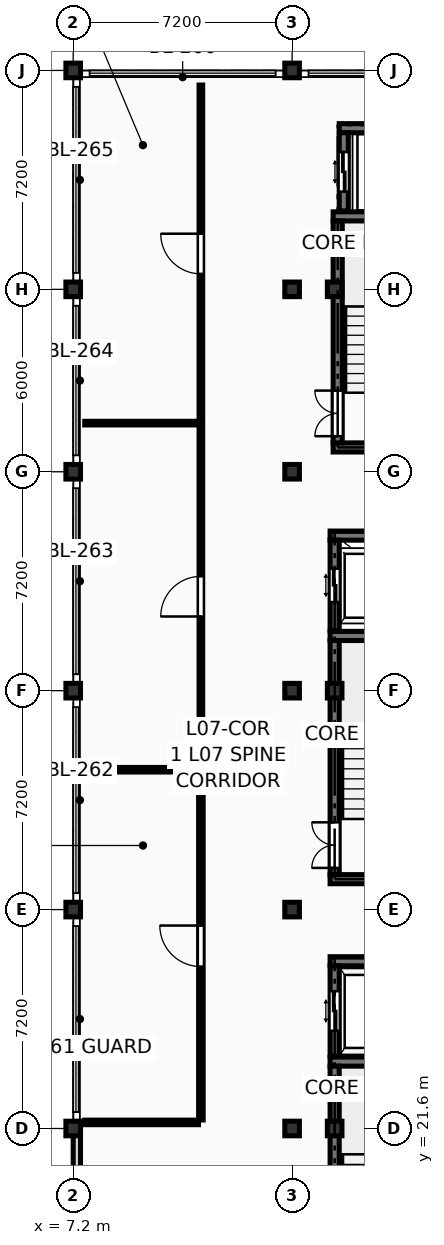
"""IFC4 building model, lengths in metres.
Left out: names, types, materials, properties, quantities, classifications, styles, units other than length and angle.
Written with IfcOpenShell. Run it as: python <this file> out.ifc"""

import sys

from ifc_helpers import new_model, si_unit, direction, frame, frame_2d, origin, origin_2d, place, context, subcontext, project, spatial, rectangle, extrude, element, fill, save


model = new_model("IFC4")
c1 = context("Model", 3, precision=1e-05, world=origin(), true_north=direction((0.0, 1.0)))
c2 = subcontext(c1, "Body", "Model", "MODEL_VIEW")
j1 = project(units=[si_unit("LENGTHUNIT", "METRE"), si_unit("PLANEANGLEUNIT", "RADIAN")], contexts=[c1])
p1 = place(None, origin())
s1 = spatial("IfcSite", under=j1, at=p1, CompositionType="ELEMENT")
p2 = place(p1, origin())
s2 = spatial("IfcBuilding", under=s1, at=p2, CompositionType="ELEMENT")
p3 = place(p2, frame((0.0, 0.0, 26.25)))
s3 = spatial("IfcBuildingStorey", under=s2, at=p3, CompositionType="ELEMENT", Elevation=26.25)
for number, where, z_axis, x_axis in (
    (1, (7.2, 21.6, 0.0), (0.0, 0.0, 1.0), (1.0, 0.0, 0.0)),
    (2, (7.2, 28.8, 0.0), (0.0, 0.0, 1.0), (1.0, 0.0, 0.0)),
    (3, (7.2, 36.0, 0.0), (0.0, 0.0, 1.0), (1.0, 0.0, 0.0)),
    (4, (7.2, 43.2, 0.0), (0.0, 0.0, 1.0), (1.0, 0.0, 0.0)),
    (5, (7.2, 49.2, 0.0), (0.0, 0.0, 1.0), (1.0, 0.0, 0.0)),
    (6, (7.2, 56.4, 0.0), (0.0, 0.0, 1.0), (1.0, 0.0, 0.0)),
    (7, (14.4, 21.6, 0.0), (0.0, 0.0, 1.0), (1.0, 0.0, 0.0)),
    (8, (14.4, 28.8, 0.0), (0.0, 0.0, 1.0), (1.0, 0.0, 0.0)),
    (9, (14.4, 36.0, 0.0), (0.0, 0.0, 1.0), (1.0, 0.0, 0.0)),
    (10, (14.4, 43.2, 0.0), (0.0, 0.0, 1.0), (1.0, 0.0, 0.0)),
    (11, (14.4, 49.2, 0.0), (0.0, 0.0, 1.0), (1.0, 0.0, 0.0)),
    (12, (14.4, 56.4, 0.0), (0.0, 0.0, 1.0), (1.0, 0.0, 0.0)),
    (13, (15.8, 21.6, 0.0), (0.0, 0.0, 1.0), (1.0, 0.0, 0.0)),
    (14, (15.8, 36.0, 0.0), (0.0, 0.0, 1.0), (1.0, 0.0, 0.0)),
    (15, (15.8, 49.2, 0.0), (0.0, 0.0, 1.0), (1.0, 0.0, 0.0)),
):
    element("IfcColumn", number, at=place(p3, frame(where, z_axis=z_axis, x_axis=x_axis)), inside=s3, PredefinedType="COLUMN", context=c2, shape_type="SweptSolid", body=[
        extrude(rectangle(XDim=0.48, YDim=0.48, at=origin_2d()), origin(), (0.0, 0.0, 1.0), 3.45),
    ])
p4 = place(p3, frame((7.32, 14.4, 0.0), z_axis=(0.0, 0.0, 1.0), x_axis=(0.0, 1.0, 0.0)))
e16 = element("IfcWall", 16, at=p4, inside=s3, PredefinedType="SOLIDWALL", context=c2, shape_type="SweptSolid", body=[
    extrude(rectangle(XDim=7.2, YDim=0.24, at=frame_2d((3.6, 0.0))), origin(), (0.0, 0.0, 1.0), 2.69),
])
p5 = place(p3, frame((15.65, 23.8, 0.0), z_axis=(0.0, 0.0, 1.0), x_axis=(1.0, 0.0, 0.0)))
e17 = element("IfcWall", 17, at=p5, inside=s3, PredefinedType="SHEAR", context=c2, shape_type="SweptSolid", body=[
    extrude(rectangle(XDim=4.82, YDim=0.3, at=frame_2d((2.41, 0.0))), origin(), (0.0, 0.0, 1.0), 3.24),
])
p6 = place(p3, frame((15.8, 15.95, 0.0), z_axis=(0.0, 0.0, 1.0), x_axis=(0.0, 1.0, 0.0)))
e18 = element("IfcWall", 18, at=p6, inside=s3, PredefinedType="SHEAR", context=c2, shape_type="SweptSolid", body=[
    extrude(rectangle(XDim=7.7, YDim=0.3, at=frame_2d((3.85, 0.0))), origin(), (0.0, 0.0, 1.0), 3.24),
])
p7 = place(p6, frame((0.22, 0.0, 0.0)))
e19 = element("IfcOpeningElement", 19, at=p7, cuts=e18, PredefinedType="OPENING", context=c2, shape_type="SweptSolid", body=[
    extrude(rectangle(XDim=1.5, YDim=2.2, at=frame_2d((0.75, 1.1))), frame((0.0, 0.162, 0.0), z_axis=(0.0, -1.0, 0.0), x_axis=(1.0, 0.0, 0.0)), (0.0, 0.0, 1.0), 0.324),
])
for number, where, z_axis, x_axis in (
    (20, (15.65, 29.8, 0.0), (0.0, 0.0, 1.0), (1.0, 0.0, 0.0)),
    (21, (15.65, 37.8, 0.0), (0.0, 0.0, 1.0), (1.0, 0.0, 0.0)),
):
    element("IfcWall", number, at=place(p3, frame(where, z_axis=z_axis, x_axis=x_axis)), inside=s3, PredefinedType="SHEAR", context=c2, shape_type="SweptSolid", body=[
        extrude(rectangle(XDim=4.82, YDim=0.3, at=frame_2d((2.41, 0.0))), origin(), (0.0, 0.0, 1.0), 3.24),
    ])
p8 = place(p3, frame((15.8, 29.95, 0.0), z_axis=(0.0, 0.0, 1.0), x_axis=(0.0, 1.0, 0.0)))
e22 = element("IfcWall", 22, at=p8, inside=s3, PredefinedType="SHEAR", context=c2, shape_type="SweptSolid", body=[
    extrude(rectangle(XDim=7.7, YDim=0.3, at=frame_2d((3.85, 0.0))), origin(), (0.0, 0.0, 1.0), 3.24),
])
p9 = place(p8, frame((0.22, 0.0, 0.0)))
e23 = element("IfcOpeningElement", 23, at=p9, cuts=e22, PredefinedType="OPENING", context=c2, shape_type="SweptSolid", body=[
    extrude(rectangle(XDim=1.5, YDim=2.2, at=frame_2d((0.75, 1.1))), frame((0.0, 0.162, 0.0), z_axis=(0.0, -1.0, 0.0), x_axis=(1.0, 0.0, 0.0)), (0.0, 0.0, 1.0), 0.324),
])
for number, where, z_axis, x_axis in (
    (24, (15.75, 44.0, 0.0), (0.0, 0.0, 1.0), (1.0, 0.0, 0.0)),
    (25, (15.75, 51.6, 0.0), (0.0, 0.0, 1.0), (1.0, 0.0, 0.0)),
):
    element("IfcWall", number, at=place(p3, frame(where, z_axis=z_axis, x_axis=x_axis)), inside=s3, PredefinedType="SHEAR", context=c2, shape_type="SweptSolid", body=[
        extrude(rectangle(XDim=4.42, YDim=0.3, at=frame_2d((2.21, 0.0))), origin(), (0.0, 0.0, 1.0), 3.24),
    ])
p10 = place(p3, frame((15.9, 44.15, 0.0), z_axis=(0.0, 0.0, 1.0), x_axis=(0.0, 1.0, 0.0)))
e26 = element("IfcWall", 26, at=p10, inside=s3, PredefinedType="SHEAR", context=c2, shape_type="SweptSolid", body=[
    extrude(rectangle(XDim=7.3, YDim=0.3, at=frame_2d((3.65, 0.0))), origin(), (0.0, 0.0, 1.0), 3.24),
])
p11 = place(p10, frame((0.22, 0.0, 0.0)))
e27 = element("IfcOpeningElement", 27, at=p11, cuts=e26, PredefinedType="OPENING", context=c2, shape_type="SweptSolid", body=[
    extrude(rectangle(XDim=1.5, YDim=2.2, at=frame_2d((0.75, 1.1))), frame((0.0, 0.162, 0.0), z_axis=(0.0, -1.0, 0.0), x_axis=(1.0, 0.0, 0.0)), (0.0, 0.0, 1.0), 0.324),
])
p12 = place(p3, frame((15.65, 27.1, 0.0), z_axis=(0.0, 0.0, 1.0), x_axis=(1.0, 0.0, 0.0)))
e28 = element("IfcWall", 28, at=p12, inside=s3, PredefinedType="SHEAR", context=c2, shape_type="SweptSolid", body=[
    extrude(rectangle(XDim=2.56, YDim=0.3, at=frame_2d((1.28, 0.0))), origin(), (0.0, 0.0, 1.0), 3.24),
])
p13 = place(p3, frame((15.8, 23.98, 0.0), z_axis=(0.0, 0.0, 1.0), x_axis=(0.0, 1.0, 0.0)))
e29 = element("IfcWall", 29, at=p13, inside=s3, PredefinedType="SHEAR", context=c2, shape_type="SweptSolid", body=[
    extrude(rectangle(XDim=2.97, YDim=0.3, at=frame_2d((1.485, 0.0))), origin(), (0.0, 0.0, 1.0), 3.24),
])
p14 = place(p13, frame((0.835, 0.0, 0.0)))
e30 = element("IfcOpeningElement", 30, at=p14, cuts=e29, PredefinedType="OPENING", context=c2, shape_type="SweptSolid", body=[
    extrude(rectangle(XDim=1.3, YDim=2.25, at=frame_2d((0.65, 1.125))), frame((0.0, 0.162, 0.0), z_axis=(0.0, -1.0, 0.0), x_axis=(1.0, 0.0, 0.0)), (0.0, 0.0, 1.0), 0.324),
])
p15 = place(p3, frame((15.65, 41.1, 0.0), z_axis=(0.0, 0.0, 1.0), x_axis=(1.0, 0.0, 0.0)))
e31 = element("IfcWall", 31, at=p15, inside=s3, PredefinedType="SHEAR", context=c2, shape_type="SweptSolid", body=[
    extrude(rectangle(XDim=2.56, YDim=0.3, at=frame_2d((1.28, 0.0))), origin(), (0.0, 0.0, 1.0), 3.24),
])
p16 = place(p3, frame((15.8, 37.98, 0.0), z_axis=(0.0, 0.0, 1.0), x_axis=(0.0, 1.0, 0.0)))
e32 = element("IfcWall", 32, at=p16, inside=s3, PredefinedType="SHEAR", context=c2, shape_type="SweptSolid", body=[
    extrude(rectangle(XDim=2.97, YDim=0.3, at=frame_2d((1.485, 0.0))), origin(), (0.0, 0.0, 1.0), 3.24),
])
p17 = place(p16, frame((0.935, 0.0, 0.0)))
e33 = element("IfcOpeningElement", 33, at=p17, cuts=e32, PredefinedType="OPENING", context=c2, shape_type="SweptSolid", body=[
    extrude(rectangle(XDim=1.1, YDim=2.2, at=frame_2d((0.55, 1.1))), frame((0.0, 0.162, 0.0), z_axis=(0.0, -1.0, 0.0), x_axis=(1.0, 0.0, 0.0)), (0.0, 0.0, 1.0), 0.324),
])
p18 = place(p3, frame((15.95, 54.5, 0.0), z_axis=(0.0, 0.0, 1.0), x_axis=(1.0, 0.0, 0.0)))
e34 = element("IfcWall", 34, at=p18, inside=s3, PredefinedType="SHEAR", context=c2, shape_type="SweptSolid", body=[
    extrude(rectangle(XDim=3.0, YDim=0.3, at=frame_2d((1.5, 0.0))), origin(), (0.0, 0.0, 1.0), 3.24),
])
p19 = place(p3, frame((16.1, 51.78, 0.0), z_axis=(0.0, 0.0, 1.0), x_axis=(0.0, 1.0, 0.0)))
e35 = element("IfcWall", 35, at=p19, inside=s3, PredefinedType="SHEAR", context=c2, shape_type="SweptSolid", body=[
    extrude(rectangle(XDim=2.57, YDim=0.3, at=frame_2d((1.285, 0.0))), origin(), (0.0, 0.0, 1.0), 3.24),
])
p20 = place(p19, frame((0.635, 0.0, 0.0)))
e36 = element("IfcOpeningElement", 36, at=p20, cuts=e35, PredefinedType="OPENING", context=c2, shape_type="SweptSolid", body=[
    extrude(rectangle(XDim=1.3, YDim=2.25, at=frame_2d((0.65, 1.125))), frame((0.0, 0.162, 0.0), z_axis=(0.0, -1.0, 0.0), x_axis=(1.0, 0.0, 0.0)), (0.0, 0.0, 1.0), 0.324),
])
p21 = place(p3, frame((7.58, 21.8, 0.0), z_axis=(0.0, 0.0, 1.0), x_axis=(1.0, 0.0, 0.0)))
e37 = element("IfcWall", 37, at=p21, inside=s3, PredefinedType="PARTITIONING", context=c2, shape_type="SweptSolid", body=[
    extrude(rectangle(XDim=3.74, YDim=0.15, at=frame_2d((1.87, 0.0))), origin(), (0.0, 0.0, 1.0), 2.541),
])
p22 = place(p3, frame((11.4, 21.88, 0.0), z_axis=(0.0, 0.0, 1.0), x_axis=(0.0, 1.0, 0.0)))
e38 = element("IfcWall", 38, at=p22, inside=s3, PredefinedType="PARTITIONING", context=c2, shape_type="SweptSolid", body=[
    extrude(rectangle(XDim=11.44, YDim=0.15, at=frame_2d((5.72, 0.0))), origin(), (0.0, 0.0, 1.0), 3.225),
])
p23 = place(p22, frame((5.045, 0.0, 0.0)))
e39 = element("IfcOpeningElement", 39, at=p23, cuts=e38, PredefinedType="OPENING", context=c2, shape_type="SweptSolid", body=[
    extrude(rectangle(XDim=1.35, YDim=2.2, at=frame_2d((0.675, 1.1))), frame((0.0, 0.087, 0.0), z_axis=(0.0, -1.0, 0.0), x_axis=(1.0, 0.0, 0.0)), (0.0, 0.0, 1.0), 0.174),
])
p24 = place(p3, frame((7.58, 33.4, 0.0), z_axis=(0.0, 0.0, 1.0), x_axis=(1.0, 0.0, 0.0)))
e40 = element("IfcWall", 40, at=p24, inside=s3, PredefinedType="PARTITIONING", context=c2, shape_type="SweptSolid", body=[
    extrude(rectangle(XDim=3.74, YDim=0.15, at=frame_2d((1.87, 0.0))), origin(), (0.0, 0.0, 1.0), 3.225),
])
p25 = place(p3, frame((11.4, 33.48, 0.0), z_axis=(0.0, 0.0, 1.0), x_axis=(0.0, 1.0, 0.0)))
e41 = element("IfcWall", 41, at=p25, inside=s3, PredefinedType="PARTITIONING", context=c2, shape_type="SweptSolid", body=[
    extrude(rectangle(XDim=11.24, YDim=0.12, at=frame_2d((5.62, 0.0))), origin(), (0.0, 0.0, 1.0), 3.225),
])
p26 = place(p25, frame((4.96, 0.0, 0.0)))
e42 = element("IfcOpeningElement", 42, at=p26, cuts=e41, PredefinedType="OPENING", context=c2, shape_type="SweptSolid", body=[
    extrude(rectangle(XDim=1.32, YDim=2.2, at=frame_2d((0.66, 1.1))), frame((0.0, 0.072, 0.0), z_axis=(0.0, -1.0, 0.0), x_axis=(1.0, 0.0, 0.0)), (0.0, 0.0, 1.0), 0.144),
])
p27 = place(p3, frame((7.58, 44.8, 0.0), z_axis=(0.0, 0.0, 1.0), x_axis=(1.0, 0.0, 0.0)))
e43 = element("IfcWall", 43, at=p27, inside=s3, PredefinedType="PARTITIONING", context=c2, shape_type="SweptSolid", body=[
    extrude(rectangle(XDim=3.74, YDim=0.12, at=frame_2d((1.87, 0.0))), origin(), (0.0, 0.0, 1.0), 3.225),
])
p28 = place(p3, frame((11.4, 44.88, 0.0), z_axis=(0.0, 0.0, 1.0), x_axis=(0.0, 1.0, 0.0)))
e44 = element("IfcWall", 44, at=p28, inside=s3, PredefinedType="PARTITIONING", context=c2, shape_type="SweptSolid", body=[
    extrude(rectangle(XDim=11.04, YDim=0.12, at=frame_2d((5.52, 0.0))), origin(), (0.0, 0.0, 1.0), 3.225),
])
p29 = place(p28, frame((4.83, 0.0, 0.0)))
e45 = element("IfcOpeningElement", 45, at=p29, cuts=e44, PredefinedType="OPENING", context=c2, shape_type="SweptSolid", body=[
    extrude(rectangle(XDim=1.32, YDim=2.2, at=frame_2d((0.66, 1.1))), frame((0.0, 0.072, 0.0), z_axis=(0.0, -1.0, 0.0), x_axis=(1.0, 0.0, 0.0)), (0.0, 0.0, 1.0), 0.144),
])
p30 = place(p9, origin())
e46 = element("IfcDoor", 46, at=p30, inside=s3, OperationType="DOUBLE_DOOR_SINGLE_SWING", PredefinedType="DOOR", context=c2, shape_type="SweptSolid", body=[
    extrude(rectangle(XDim=1.5, YDim=2.2, at=frame_2d((0.75, 1.1))), frame((0.0, 0.025, 0.0), z_axis=(0.0, -1.0, 0.0), x_axis=(1.0, 0.0, 0.0)), (0.0, 0.0, 1.0), 0.05),
])
fill(e23, e46)
p31 = place(p11, origin())
e47 = element("IfcDoor", 47, at=p31, inside=s3, OperationType="DOUBLE_DOOR_SINGLE_SWING", PredefinedType="DOOR", context=c2, shape_type="SweptSolid", body=[
    extrude(rectangle(XDim=1.5, YDim=2.2, at=frame_2d((0.75, 1.1))), frame((0.0, 0.025, 0.0), z_axis=(0.0, -1.0, 0.0), x_axis=(1.0, 0.0, 0.0)), (0.0, 0.0, 1.0), 0.05),
])
fill(e27, e47)
p32 = place(p14, origin())
e48 = element("IfcDoor", 48, at=p32, inside=s3, OperationType="DOUBLE_DOOR_SLIDING", PredefinedType="DOOR", context=c2, shape_type="SweptSolid", body=[
    extrude(rectangle(XDim=1.3, YDim=2.25, at=frame_2d((0.65, 1.125))), frame((0.0, 0.025, 0.0), z_axis=(0.0, -1.0, 0.0), x_axis=(1.0, 0.0, 0.0)), (0.0, 0.0, 1.0), 0.05),
])
fill(e30, e48)
p33 = place(p17, origin())
e49 = element("IfcDoor", 49, at=p33, inside=s3, OperationType="DOUBLE_DOOR_SLIDING", PredefinedType="DOOR", context=c2, shape_type="SweptSolid", body=[
    extrude(rectangle(XDim=1.1, YDim=2.2, at=frame_2d((0.55, 1.1))), frame((0.0, 0.025, 0.0), z_axis=(0.0, -1.0, 0.0), x_axis=(1.0, 0.0, 0.0)), (0.0, 0.0, 1.0), 0.05),
])
fill(e33, e49)
p34 = place(p20, origin())
e50 = element("IfcDoor", 50, at=p34, inside=s3, OperationType="DOUBLE_DOOR_SLIDING", PredefinedType="DOOR", context=c2, shape_type="SweptSolid", body=[
    extrude(rectangle(XDim=1.3, YDim=2.25, at=frame_2d((0.65, 1.125))), frame((0.0, 0.025, 0.0), z_axis=(0.0, -1.0, 0.0), x_axis=(1.0, 0.0, 0.0)), (0.0, 0.0, 1.0), 0.05),
])
fill(e36, e50)
p35 = place(p23, origin())
e51 = element("IfcDoor", 51, at=p35, inside=s3, OperationType="SINGLE_SWING_RIGHT", PredefinedType="DOOR", context=c2, shape_type="SweptSolid", body=[
    extrude(rectangle(XDim=1.35, YDim=2.2, at=frame_2d((0.675, 1.1))), frame((0.0, 0.025, 0.0), z_axis=(0.0, -1.0, 0.0), x_axis=(1.0, 0.0, 0.0)), (0.0, 0.0, 1.0), 0.05),
])
fill(e39, e51)
p36 = place(p26, origin())
e52 = element("IfcDoor", 52, at=p36, inside=s3, OperationType="SINGLE_SWING_LEFT", PredefinedType="DOOR", context=c2, shape_type="SweptSolid", body=[
    extrude(rectangle(XDim=1.32, YDim=2.2, at=frame_2d((0.66, 1.1))), frame((0.0, 0.025, 0.0), z_axis=(0.0, -1.0, 0.0), x_axis=(1.0, 0.0, 0.0)), (0.0, 0.0, 1.0), 0.05),
])
fill(e42, e52)
p37 = place(p29, origin())
e53 = element("IfcDoor", 53, at=p37, inside=s3, OperationType="SINGLE_SWING_RIGHT", PredefinedType="DOOR", context=c2, shape_type="SweptSolid", body=[
    extrude(rectangle(XDim=1.32, YDim=2.2, at=frame_2d((0.66, 1.1))), frame((0.0, 0.025, 0.0), z_axis=(0.0, -1.0, 0.0), x_axis=(1.0, 0.0, 0.0)), (0.0, 0.0, 1.0), 0.05),
])
fill(e45, e53)
save(model, sys.argv[1])
